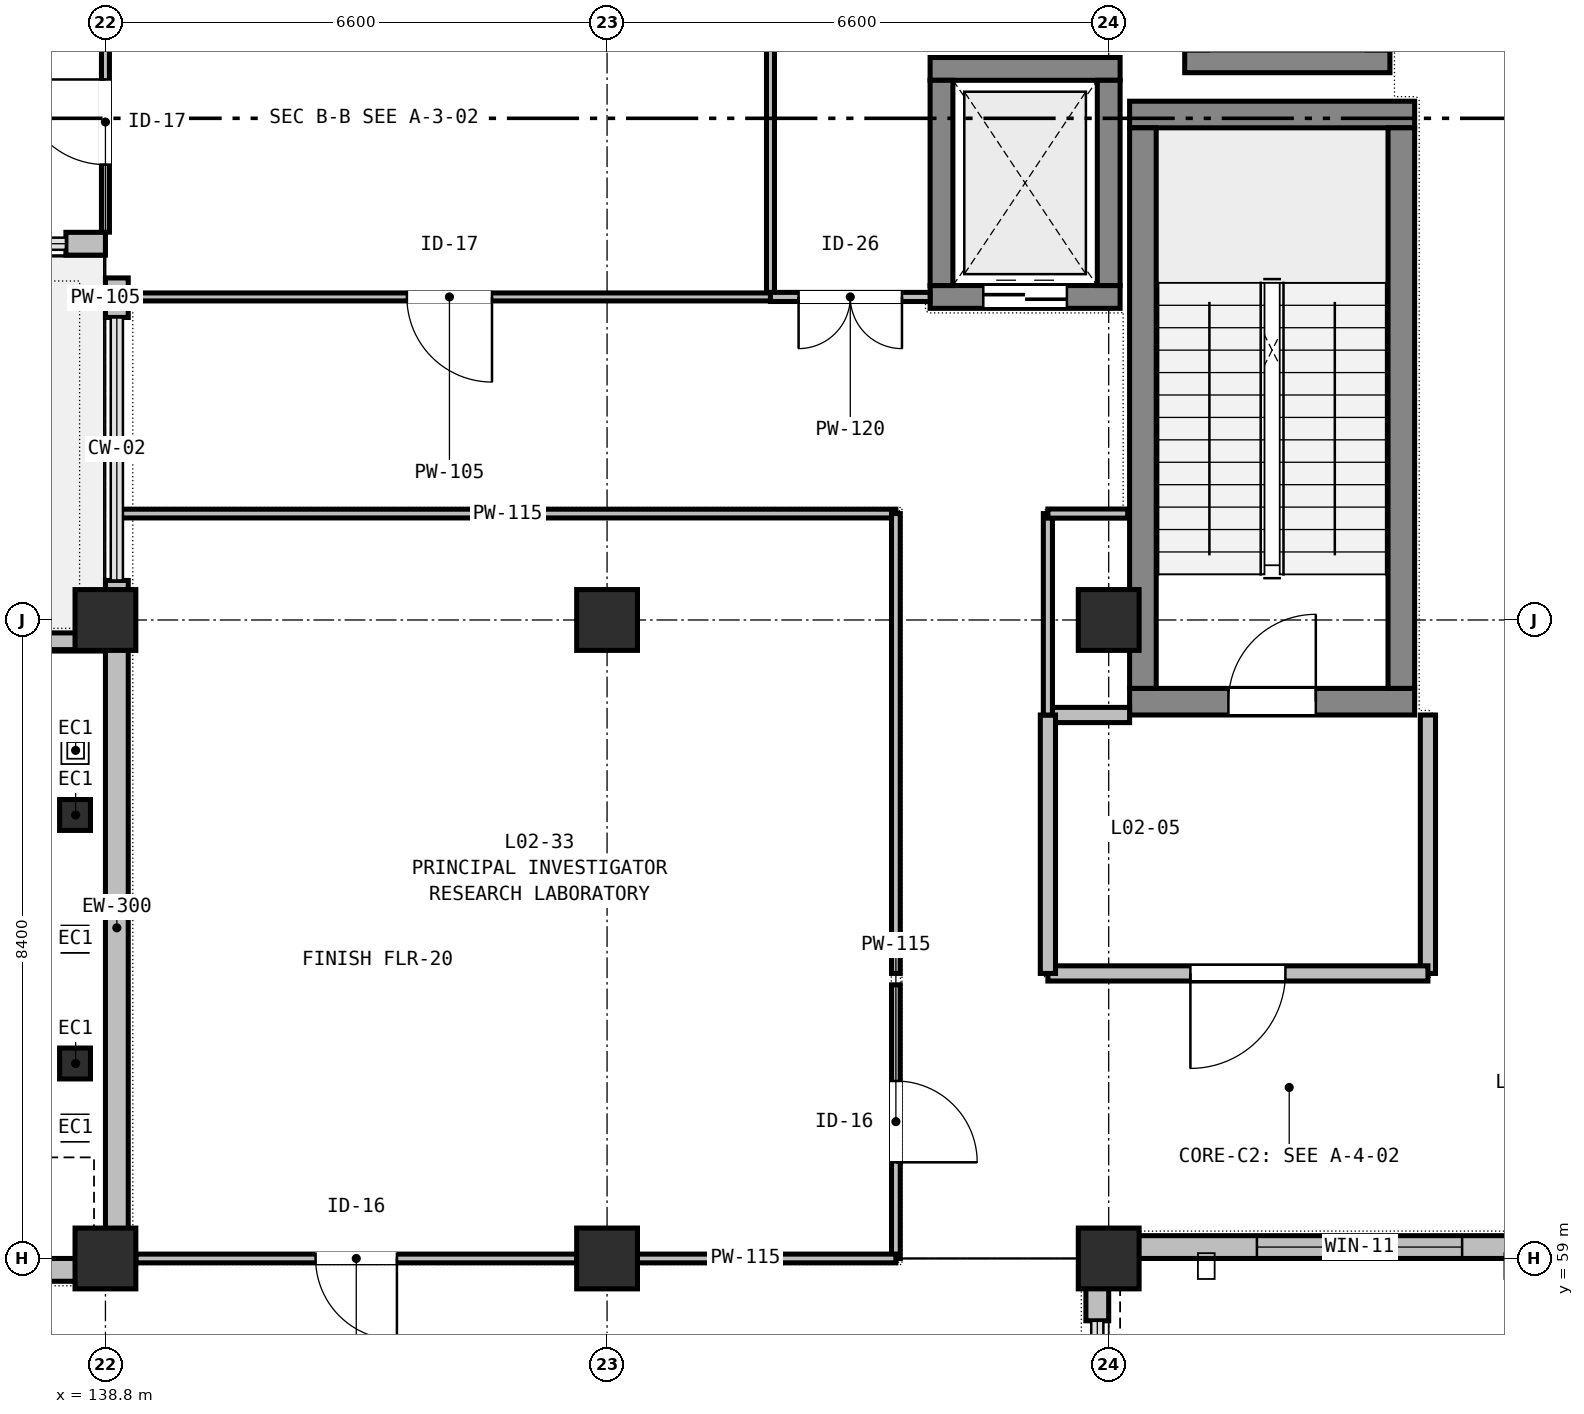
"""IFC4 building model, lengths in metres.
Left out: names, types, materials, properties, quantities, classifications, styles, units other than length and angle.
Written with IfcOpenShell. Run it as: python <this file> out.ifc"""

import sys

from ifc_helpers import new_model, si_unit, direction, frame, frame_2d, origin, origin_2d, place, context, subcontext, project, spatial, rectangle, hollow_circle, extrude, element, fill, save


model = new_model("IFC4")
c1 = context("Model", 3, precision=1e-05, world=origin(), true_north=direction((0.0, 1.0)))
c2 = subcontext(c1, "Body", "Model", "MODEL_VIEW")
j1 = project(units=[si_unit("LENGTHUNIT", "METRE"), si_unit("PLANEANGLEUNIT", "RADIAN")], contexts=[c1])
p1 = place(None, origin())
s1 = spatial("IfcSite", under=j1, at=p1, CompositionType="ELEMENT")
p2 = place(p1, origin())
s2 = spatial("IfcBuilding", under=s1, at=p2, CompositionType="ELEMENT")
p3 = place(p2, frame((0.0, 0.0, 10.2)))
s3 = spatial("IfcBuildingStorey", under=s2, at=p3, CompositionType="ELEMENT", Elevation=10.2)
for number, where, z_axis, x_axis in (
    (1, (138.8, 59.0, 0.0), (0.0, 0.0, 1.0), (1.0, 0.0, 0.0)),
    (2, (138.8, 67.4, 0.0), (0.0, 0.0, 1.0), (1.0, 0.0, 0.0)),
    (3, (145.4, 59.0, 0.0), (0.0, 0.0, 1.0), (1.0, 0.0, 0.0)),
    (4, (145.4, 67.4, 0.0), (0.0, 0.0, 1.0), (1.0, 0.0, 0.0)),
    (5, (152.0, 59.0, 0.0), (0.0, 0.0, 1.0), (1.0, 0.0, 0.0)),
    (6, (152.0, 67.4, 0.0), (0.0, 0.0, 1.0), (1.0, 0.0, 0.0)),
):
    element("IfcColumn", number, at=place(p3, frame(where, z_axis=z_axis, x_axis=x_axis)), inside=s3, PredefinedType="COLUMN", context=c2, shape_type="SweptSolid", body=[
        extrude(rectangle(XDim=0.8, YDim=0.8, at=origin_2d()), origin(), (0.0, 0.0, 1.0), 4.8),
    ])
p4 = place(p3, frame((152.275, 66.325, 0.0), z_axis=(0.0, 0.0, 1.0), x_axis=(1.0, 0.0, 0.0)))
e7 = element("IfcWall", 7, at=p4, inside=s3, PredefinedType="SHEAR", context=c2, shape_type="SweptSolid", body=[
    extrude(rectangle(XDim=3.75, YDim=0.35, at=frame_2d((1.875, 0.0))), origin(), (0.0, 0.0, 1.0), 4.8),
])
p5 = place(p4, frame((1.3, 0.0, 0.0)))
e8 = element("IfcOpeningElement", 8, at=p5, cuts=e7, PredefinedType="OPENING", context=c2, shape_type="SweptSolid", body=[
    extrude(rectangle(XDim=1.15, YDim=2.15, at=frame_2d((0.575, 1.075))), frame((0.0, 0.185, 0.0), z_axis=(0.0, -1.0, 0.0), x_axis=(1.0, 0.0, 0.0)), (0.0, 0.0, 1.0), 0.37),
])
p6 = place(p3, frame((152.275, 74.05, 0.0), z_axis=(0.0, 0.0, 1.0), x_axis=(1.0, 0.0, 0.0)))
e9 = element("IfcWall", 9, at=p6, inside=s3, PredefinedType="SHEAR", context=c2, shape_type="SweptSolid", body=[
    extrude(rectangle(XDim=3.75, YDim=0.35, at=frame_2d((1.875, 0.0))), origin(), (0.0, 0.0, 1.0), 4.8),
])
for number, where, z_axis, x_axis in (
    (10, (152.45, 66.5, 0.0), (0.0, 0.0, 1.0), (0.0, 1.0, 0.0)),
    (11, (155.85, 66.5, 0.0), (0.0, 0.0, 1.0), (0.0, 1.0, 0.0)),
):
    element("IfcWall", number, at=place(p3, frame(where, z_axis=z_axis, x_axis=x_axis)), inside=s3, PredefinedType="SHEAR", context=c2, shape_type="SweptSolid", body=[
        extrude(rectangle(XDim=7.375, YDim=0.35, at=frame_2d((3.688, 0.0))), origin(), (0.0, 0.0, 1.0), 4.8),
    ])
p7 = place(p3, frame((149.65, 71.65, 0.0), z_axis=(0.0, 0.0, 1.0), x_axis=(1.0, 0.0, 0.0)))
e12 = element("IfcWall", 12, at=p7, inside=s3, PredefinedType="SHEAR", context=c2, shape_type="SweptSolid", body=[
    extrude(rectangle(XDim=2.5, YDim=0.3, at=frame_2d((1.25, 0.0))), origin(), (0.0, 0.0, 1.0), 4.8),
])
p8 = place(p7, frame((0.7, 0.0, 0.0)))
e13 = element("IfcOpeningElement", 13, at=p8, cuts=e12, PredefinedType="OPENING", context=c2, shape_type="SweptSolid", body=[
    extrude(rectangle(XDim=1.1, YDim=2.1, at=frame_2d((0.55, 1.05))), frame((0.0, 0.16, 0.0), z_axis=(0.0, -1.0, 0.0), x_axis=(1.0, 0.0, 0.0)), (0.0, 0.0, 1.0), 0.32),
])
p9 = place(p3, frame((149.65, 74.65, 0.0), z_axis=(0.0, 0.0, 1.0), x_axis=(1.0, 0.0, 0.0)))
e14 = element("IfcWall", 14, at=p9, inside=s3, PredefinedType="SHEAR", context=c2, shape_type="SweptSolid", body=[
    extrude(rectangle(XDim=2.5, YDim=0.3, at=frame_2d((1.25, 0.0))), origin(), (0.0, 0.0, 1.0), 4.8),
])
for number, where, z_axis, x_axis in (
    (15, (149.8, 71.8, 0.0), (0.0, 0.0, 1.0), (0.0, 1.0, 0.0)),
    (16, (152.0, 71.8, 0.0), (0.0, 0.0, 1.0), (0.0, 1.0, 0.0)),
    (17, (153.0, 74.75, 0.0), (0.0, 0.0, 1.0), (1.0, 0.0, 0.0)),
):
    element("IfcWall", number, at=place(p3, frame(where, z_axis=z_axis, x_axis=x_axis)), inside=s3, PredefinedType="SHEAR", context=c2, shape_type="SweptSolid", body=[
        extrude(rectangle(XDim=2.7, YDim=0.3, at=frame_2d((1.35, 0.0))), origin(), (0.0, 0.0, 1.0), 4.8),
    ])
for number, where, z_axis, x_axis in (
    (18, (138.4, 61.565, 0.0), (0.0, 0.0, 1.0), (1.0, 0.0, 0.0)),
    (19, (138.4, 64.835, 0.0), (0.0, 0.0, 1.0), (1.0, 0.0, 0.0)),
):
    element("IfcColumn", number, at=place(p3, frame(where, z_axis=z_axis, x_axis=x_axis)), inside=s3, PredefinedType="COLUMN", context=c2, shape_type="SweptSolid", body=[
        extrude(hollow_circle(Radius=0.203, WallThickness=0.014, at=origin_2d()), origin(), (0.0, 0.0, 1.0), 2.856),
    ])
p10 = place(p3, frame((132.2, 58.85, 0.0), z_axis=(0.0, 0.0, 1.0), x_axis=(1.0, 0.0, 0.0)))
e20 = element("IfcWall", 20, at=p10, inside=s3, PredefinedType="STANDARD", context=c2, shape_type="SweptSolid", body=[
    extrude(rectangle(XDim=6.6, YDim=0.3, at=frame_2d((3.3, 0.0))), origin(), (0.0, 0.0, 1.0), 3.935),
])
p11 = place(p10, frame((1.032, 0.0, 0.9)))
e21 = element("IfcOpeningElement", 21, at=p11, cuts=e20, PredefinedType="OPENING", context=c2, shape_type="SweptSolid", body=[
    extrude(rectangle(XDim=1.5, YDim=2.1, at=frame_2d((0.75, 1.05))), frame((0.0, 0.16, 0.0), z_axis=(0.0, -1.0, 0.0), x_axis=(1.0, 0.0, 0.0)), (0.0, 0.0, 1.0), 0.32),
])
p12 = place(p10, frame((4.068, 0.0, 0.9)))
e22 = element("IfcOpeningElement", 22, at=p12, cuts=e20, PredefinedType="OPENING", context=c2, shape_type="SweptSolid", body=[
    extrude(rectangle(XDim=1.5, YDim=2.1, at=frame_2d((0.75, 1.05))), frame((0.0, 0.16, 0.0), z_axis=(0.0, -1.0, 0.0), x_axis=(1.0, 0.0, 0.0)), (0.0, 0.0, 1.0), 0.32),
])
p13 = place(p3, frame((138.95, 59.3, 0.0), z_axis=(0.0, 0.0, 1.0), x_axis=(0.0, 1.0, 0.0)))
e23 = element("IfcWall", 23, at=p13, inside=s3, PredefinedType="STANDARD", context=c2, shape_type="SweptSolid", body=[
    extrude(rectangle(XDim=8.1, YDim=0.3, at=frame_2d((4.05, 0.0))), origin(), (0.0, 0.0, 1.0), 3.935),
])
for number, where, z_axis, x_axis in (
    (24, (138.95, 67.4, 0.0), (0.0, 0.0, 1.0), (0.0, 1.0, 0.0)),
    (25, (138.95, 71.38, 0.0), (0.0, 0.0, 1.0), (0.0, 1.0, 0.0)),
    (26, (138.8, 72.35, 0.0), (0.0, 0.0, 1.0), (-1.0, 0.0, 0.0)),
):
    element("IfcWall", number, at=place(p3, frame(where, z_axis=z_axis, x_axis=x_axis)), inside=s3, PredefinedType="STANDARD", context=c2, shape_type="SweptSolid", body=[
        extrude(rectangle(XDim=0.52, YDim=0.3, at=frame_2d((0.26, 0.0))), origin(), (0.0, 0.0, 1.0), 3.935),
    ])
p14 = place(p3, frame((158.6, 59.15, 0.0), z_axis=(0.0, 0.0, 1.0), x_axis=(-1.0, 0.0, 0.0)))
e27 = element("IfcWall", 27, at=p14, inside=s3, PredefinedType="STANDARD", context=c2, shape_type="SweptSolid", body=[
    extrude(rectangle(XDim=6.6, YDim=0.3, at=frame_2d((3.3, 0.0))), origin(), (0.0, 0.0, 1.0), 3.935),
])
p15 = place(p14, frame((1.95, 0.0, 0.75)))
e28 = element("IfcOpeningElement", 28, at=p15, cuts=e27, PredefinedType="OPENING", context=c2, shape_type="SweptSolid", body=[
    extrude(rectangle(XDim=2.7, YDim=2.2, at=frame_2d((1.35, 1.1))), frame((0.0, 0.16, 0.0), z_axis=(0.0, -1.0, 0.0), x_axis=(1.0, 0.0, 0.0)), (0.0, 0.0, 1.0), 0.32),
])
p16 = place(p3, frame((151.85, 58.7, 0.0), z_axis=(0.0, 0.0, 1.0), x_axis=(0.0, -1.0, 0.0)))
e29 = element("IfcWall", 29, at=p16, inside=s3, PredefinedType="STANDARD", context=c2, shape_type="SweptSolid", body=[
    extrude(rectangle(XDim=0.52, YDim=0.3, at=frame_2d((0.26, 0.0))), origin(), (0.0, 0.0, 1.0), 4.085),
])
p17 = place(p3, frame((138.55, 67.12, 0.0), z_axis=(0.0, 0.0, 1.0), x_axis=(-1.0, 0.0, 0.0)))
e30 = element("IfcWall", 30, at=p17, inside=s3, PredefinedType="PARAPET", context=c2, shape_type="SweptSolid", body=[
    extrude(rectangle(XDim=19.83, YDim=0.22, at=frame_2d((9.915, 0.0))), origin(), (0.0, 0.0, 1.0), 0.68),
])
p18 = place(p3, frame((151.2, 66.15, 0.0), z_axis=(0.0, 0.0, 1.0), x_axis=(1.0, 0.0, 0.0)))
e31 = element("IfcWall", 31, at=p18, inside=s3, PredefinedType="PARTITIONING", context=c2, shape_type="SweptSolid", body=[
    extrude(rectangle(XDim=1.075, YDim=0.2, at=frame_2d((0.538, 0.0))), origin(), (0.0, 0.0, 1.0), 3.935),
])
p19 = place(p3, frame((156.2, 66.15, 0.0), z_axis=(0.0, 0.0, 1.0), x_axis=(0.0, -1.0, 0.0)))
e32 = element("IfcWall", 32, at=p19, inside=s3, PredefinedType="PARTITIONING", context=c2, shape_type="SweptSolid", body=[
    extrude(rectangle(XDim=3.4, YDim=0.2, at=frame_2d((1.7, 0.0))), origin(), (0.0, 0.0, 1.0), 4.495),
])
p20 = place(p3, frame((156.2, 62.75, 0.0), z_axis=(0.0, 0.0, 1.0), x_axis=(-1.0, 0.0, 0.0)))
e33 = element("IfcWall", 33, at=p20, inside=s3, PredefinedType="PARTITIONING", context=c2, shape_type="SweptSolid", body=[
    extrude(rectangle(XDim=5.0, YDim=0.2, at=frame_2d((2.5, 0.0))), origin(), (0.0, 0.0, 1.0), 3.935),
])
p21 = place(p20, frame((1.875, 0.0, 0.0)))
e34 = element("IfcOpeningElement", 34, at=p21, cuts=e33, PredefinedType="OPENING", context=c2, shape_type="SweptSolid", body=[
    extrude(rectangle(XDim=1.25, YDim=2.15, at=frame_2d((0.625, 1.075))), frame((0.0, 0.11, 0.0), z_axis=(0.0, -1.0, 0.0), x_axis=(1.0, 0.0, 0.0)), (0.0, 0.0, 1.0), 0.22),
])
p22 = place(p3, frame((151.2, 62.75, 0.0), z_axis=(0.0, 0.0, 1.0), x_axis=(0.0, 1.0, 0.0)))
e35 = element("IfcWall", 35, at=p22, inside=s3, PredefinedType="PARTITIONING", context=c2, shape_type="SweptSolid", body=[
    extrude(rectangle(XDim=3.4, YDim=0.2, at=frame_2d((1.7, 0.0))), origin(), (0.0, 0.0, 1.0), 4.495),
])
p23 = place(p3, frame((149.2, 62.6, 0.0), z_axis=(0.0, 0.0, 1.0), x_axis=(0.0, -1.0, 0.0)))
e36 = element("IfcWall", 36, at=p23, inside=s3, PredefinedType="PARTITIONING", context=c2, shape_type="SweptSolid", body=[
    extrude(rectangle(XDim=3.6, YDim=0.115, at=frame_2d((1.8, 0.0))), origin(), (0.0, 0.0, 1.0), 4.135),
])
p24 = place(p23, frame((1.265, 0.0, 0.0)))
e37 = element("IfcOpeningElement", 37, at=p24, cuts=e36, PredefinedType="OPENING", context=c2, shape_type="SweptSolid", body=[
    extrude(rectangle(XDim=1.07, YDim=2.1, at=frame_2d((0.535, 1.05))), frame((0.0, 0.067, 0.0), z_axis=(0.0, -1.0, 0.0), x_axis=(1.0, 0.0, 0.0)), (0.0, 0.0, 1.0), 0.135),
])
p25 = place(p3, frame((149.2, 59.0, 0.0), z_axis=(0.0, 0.0, 1.0), x_axis=(-1.0, 0.0, 0.0)))
e38 = element("IfcWall", 38, at=p25, inside=s3, PredefinedType="PARTITIONING", context=c2, shape_type="SweptSolid", body=[
    extrude(rectangle(XDim=3.4, YDim=0.115, at=frame_2d((1.7, 0.0))), origin(), (0.0, 0.0, 1.0), 4.135),
])
p26 = place(p3, frame((145.0, 59.0, 0.0), z_axis=(0.0, 0.0, 1.0), x_axis=(-1.0, 0.0, 0.0)))
e39 = element("IfcWall", 39, at=p26, inside=s3, PredefinedType="PARTITIONING", context=c2, shape_type="SweptSolid", body=[
    extrude(rectangle(XDim=5.8, YDim=0.115, at=frame_2d((2.9, 0.0))), origin(), (0.0, 0.0, 1.0), 4.135),
])
p27 = place(p26, frame((2.365, 0.0, 0.0)))
e40 = element("IfcOpeningElement", 40, at=p27, cuts=e39, PredefinedType="OPENING", context=c2, shape_type="SweptSolid", body=[
    extrude(rectangle(XDim=1.07, YDim=2.1, at=frame_2d((0.535, 1.05))), frame((0.0, 0.067, 0.0), z_axis=(0.0, -1.0, 0.0), x_axis=(1.0, 0.0, 0.0)), (0.0, 0.0, 1.0), 0.135),
])
p28 = place(p3, frame((138.98, 68.8, 0.0), z_axis=(0.0, 0.0, 1.0), x_axis=(1.0, 0.0, 0.0)))
e41 = element("IfcWall", 41, at=p28, inside=s3, PredefinedType="PARTITIONING", context=c2, shape_type="SweptSolid", body=[
    extrude(rectangle(XDim=10.22, YDim=0.115, at=frame_2d((5.11, 0.0))), origin(), (0.0, 0.0, 1.0), 3.935),
])
p29 = place(p3, frame((149.2, 68.8, 0.0), z_axis=(0.0, 0.0, 1.0), x_axis=(0.0, -1.0, 0.0)))
e42 = element("IfcWall", 42, at=p29, inside=s3, PredefinedType="PARTITIONING", context=c2, shape_type="SweptSolid", body=[
    extrude(rectangle(XDim=6.05, YDim=0.115, at=frame_2d((3.025, 0.0))), origin(), (0.0, 0.0, 1.0), 4.135),
])
p30 = place(p3, frame((138.8, 72.502, 0.0), z_axis=(0.0, 0.0, 1.0), x_axis=(0.0, 1.0, 0.0)))
e43 = element("IfcWall", 43, at=p30, inside=s3, PredefinedType="PARTITIONING", context=c2, shape_type="SweptSolid", body=[
    extrude(rectangle(XDim=2.898, YDim=0.105, at=frame_2d((1.449, 0.0))), origin(), (0.0, 0.0, 1.0), 3.935),
])
p31 = place(p30, frame((0.889, 0.0, 0.0)))
e44 = element("IfcOpeningElement", 44, at=p31, cuts=e43, PredefinedType="OPENING", context=c2, shape_type="SweptSolid", body=[
    extrude(rectangle(XDim=1.12, YDim=2.1, at=frame_2d((0.56, 1.05))), frame((0.0, 0.062, 0.0), z_axis=(0.0, -1.0, 0.0), x_axis=(1.0, 0.0, 0.0)), (0.0, 0.0, 1.0), 0.125),
])
p32 = place(p3, frame((147.55, 84.02, 0.0), z_axis=(0.0, 0.0, 1.0), x_axis=(0.0, -1.0, 0.0)))
e45 = element("IfcWall", 45, at=p32, inside=s3, PredefinedType="PARTITIONING", context=c2, shape_type="SweptSolid", body=[
    extrude(rectangle(XDim=12.37, YDim=0.105, at=frame_2d((6.185, 0.0))), origin(), (0.0, 0.0, 1.0), 4.085),
])
p33 = place(p3, frame((147.55, 71.65, 0.0), z_axis=(0.0, 0.0, 1.0), x_axis=(-1.0, 0.0, 0.0)))
e46 = element("IfcWall", 46, at=p33, inside=s3, PredefinedType="PARTITIONING", context=c2, shape_type="SweptSolid", body=[
    extrude(rectangle(XDim=8.448, YDim=0.105, at=frame_2d((4.224, 0.0))), origin(), (0.0, 0.0, 1.0), 3.935),
])
p34 = place(p33, frame((3.664, 0.0, 0.0)))
e47 = element("IfcOpeningElement", 47, at=p34, cuts=e46, PredefinedType="OPENING", context=c2, shape_type="SweptSolid", body=[
    extrude(rectangle(XDim=1.12, YDim=2.1, at=frame_2d((0.56, 1.05))), frame((0.0, 0.062, 0.0), z_axis=(0.0, -1.0, 0.0), x_axis=(1.0, 0.0, 0.0)), (0.0, 0.0, 1.0), 0.125),
])
p35 = place(p3, frame((151.2, 66.15, 0.0), z_axis=(0.0, 0.0, 1.0), x_axis=(0.0, 1.0, 0.0)))
e48 = element("IfcWall", 48, at=p35, inside=s3, PredefinedType="PARTITIONING", context=c2, shape_type="SweptSolid", body=[
    extrude(rectangle(XDim=2.65, YDim=0.12, at=frame_2d((1.325, 0.0))), origin(), (0.0, 0.0, 1.0), 4.135),
])
p36 = place(p3, frame((151.2, 68.8, 0.0), z_axis=(0.0, 0.0, 1.0), x_axis=(1.0, 0.0, 0.0)))
e49 = element("IfcWall", 49, at=p36, inside=s3, PredefinedType="PARTITIONING", context=c2, shape_type="SweptSolid", body=[
    extrude(rectangle(XDim=1.05, YDim=0.12, at=frame_2d((0.525, 0.0))), origin(), (0.0, 0.0, 1.0), 3.935),
])
p37 = place(p3, frame((149.65, 71.65, 0.0), z_axis=(0.0, 0.0, 1.0), x_axis=(-1.0, 0.0, 0.0)))
e50 = element("IfcWall", 50, at=p37, inside=s3, PredefinedType="PARTITIONING", context=c2, shape_type="SweptSolid", body=[
    extrude(rectangle(XDim=2.1, YDim=0.12, at=frame_2d((1.05, 0.0))), origin(), (0.0, 0.0, 1.0), 4.285),
])
p38 = place(p37, frame((0.37, 0.0, 0.0)))
e51 = element("IfcOpeningElement", 51, at=p38, cuts=e50, PredefinedType="OPENING", context=c2, shape_type="SweptSolid", body=[
    extrude(rectangle(XDim=1.36, YDim=2.14, at=frame_2d((0.68, 1.07))), frame((0.0, 0.07, 0.0), z_axis=(0.0, -1.0, 0.0), x_axis=(1.0, 0.0, 0.0)), (0.0, 0.0, 1.0), 0.14),
])
p39 = place(p15, origin())
e52 = element("IfcWindow", 52, at=p39, inside=s3, PartitioningType="SINGLE_PANEL", PredefinedType="WINDOW", context=c2, shape_type="SweptSolid", body=[
    extrude(rectangle(XDim=2.7, YDim=2.2, at=frame_2d((1.35, 1.1))), frame((0.0, 0.03, 0.0), z_axis=(0.0, -1.0, 0.0), x_axis=(1.0, 0.0, 0.0)), (0.0, 0.0, 1.0), 0.06),
])
fill(e28, e52)
p40 = place(p5, origin())
e53 = element("IfcDoor", 53, at=p40, inside=s3, OperationType="SINGLE_SWING_RIGHT", PredefinedType="DOOR", context=c2, shape_type="SweptSolid", body=[
    extrude(rectangle(XDim=1.15, YDim=2.15, at=frame_2d((0.575, 1.075))), frame((0.0, 0.025, 0.0), z_axis=(0.0, -1.0, 0.0), x_axis=(1.0, 0.0, 0.0)), (0.0, 0.0, 1.0), 0.05),
])
fill(e8, e53)
p41 = place(p8, origin())
e54 = element("IfcDoor", 54, at=p41, inside=s3, OperationType="DOUBLE_DOOR_SLIDING", PredefinedType="DOOR", context=c2, shape_type="SweptSolid", body=[
    extrude(rectangle(XDim=1.1, YDim=2.1, at=frame_2d((0.55, 1.05))), frame((0.0, 0.025, 0.0), z_axis=(0.0, -1.0, 0.0), x_axis=(1.0, 0.0, 0.0)), (0.0, 0.0, 1.0), 0.05),
])
fill(e13, e54)
p42 = place(p21, origin())
e55 = element("IfcDoor", 55, at=p42, inside=s3, OperationType="SINGLE_SWING_RIGHT", PredefinedType="DOOR", context=c2, shape_type="SweptSolid", body=[
    extrude(rectangle(XDim=1.25, YDim=2.15, at=frame_2d((0.625, 1.075))), frame((0.0, 0.025, 0.0), z_axis=(0.0, -1.0, 0.0), x_axis=(1.0, 0.0, 0.0)), (0.0, 0.0, 1.0), 0.05),
])
fill(e34, e55)
p43 = place(p27, origin())
e56 = element("IfcDoor", 56, at=p43, inside=s3, OperationType="SINGLE_SWING_LEFT", PredefinedType="DOOR", context=c2, shape_type="SweptSolid", body=[
    extrude(rectangle(XDim=1.07, YDim=2.1, at=frame_2d((0.535, 1.05))), frame((0.0, 0.025, 0.0), z_axis=(0.0, -1.0, 0.0), x_axis=(1.0, 0.0, 0.0)), (0.0, 0.0, 1.0), 0.05),
])
fill(e40, e56)
p44 = place(p24, origin())
e57 = element("IfcDoor", 57, at=p44, inside=s3, OperationType="SINGLE_SWING_RIGHT", PredefinedType="DOOR", context=c2, shape_type="SweptSolid", body=[
    extrude(rectangle(XDim=1.07, YDim=2.1, at=frame_2d((0.535, 1.05))), frame((0.0, 0.025, 0.0), z_axis=(0.0, -1.0, 0.0), x_axis=(1.0, 0.0, 0.0)), (0.0, 0.0, 1.0), 0.05),
])
fill(e37, e57)
p45 = place(p34, origin())
e58 = element("IfcDoor", 58, at=p45, inside=s3, OperationType="SINGLE_SWING_LEFT", PredefinedType="DOOR", context=c2, shape_type="SweptSolid", body=[
    extrude(rectangle(XDim=1.12, YDim=2.1, at=frame_2d((0.56, 1.05))), frame((0.0, 0.025, 0.0), z_axis=(0.0, -1.0, 0.0), x_axis=(1.0, 0.0, 0.0)), (0.0, 0.0, 1.0), 0.05),
])
fill(e47, e58)
p46 = place(p31, origin())
e59 = element("IfcDoor", 59, at=p46, inside=s3, OperationType="SINGLE_SWING_RIGHT", PredefinedType="DOOR", context=c2, shape_type="SweptSolid", body=[
    extrude(rectangle(XDim=1.12, YDim=2.1, at=frame_2d((0.56, 1.05))), frame((0.0, 0.025, 0.0), z_axis=(0.0, -1.0, 0.0), x_axis=(1.0, 0.0, 0.0)), (0.0, 0.0, 1.0), 0.05),
])
fill(e44, e59)
p47 = place(p38, origin())
e60 = element("IfcDoor", 60, at=p47, inside=s3, OperationType="DOUBLE_DOOR_SINGLE_SWING", PredefinedType="DOOR", context=c2, shape_type="SweptSolid", body=[
    extrude(rectangle(XDim=1.36, YDim=2.14, at=frame_2d((0.68, 1.07))), frame((0.0, 0.025, 0.0), z_axis=(0.0, -1.0, 0.0), x_axis=(1.0, 0.0, 0.0)), (0.0, 0.0, 1.0), 0.05),
])
fill(e51, e60)
save(model, sys.argv[1])
